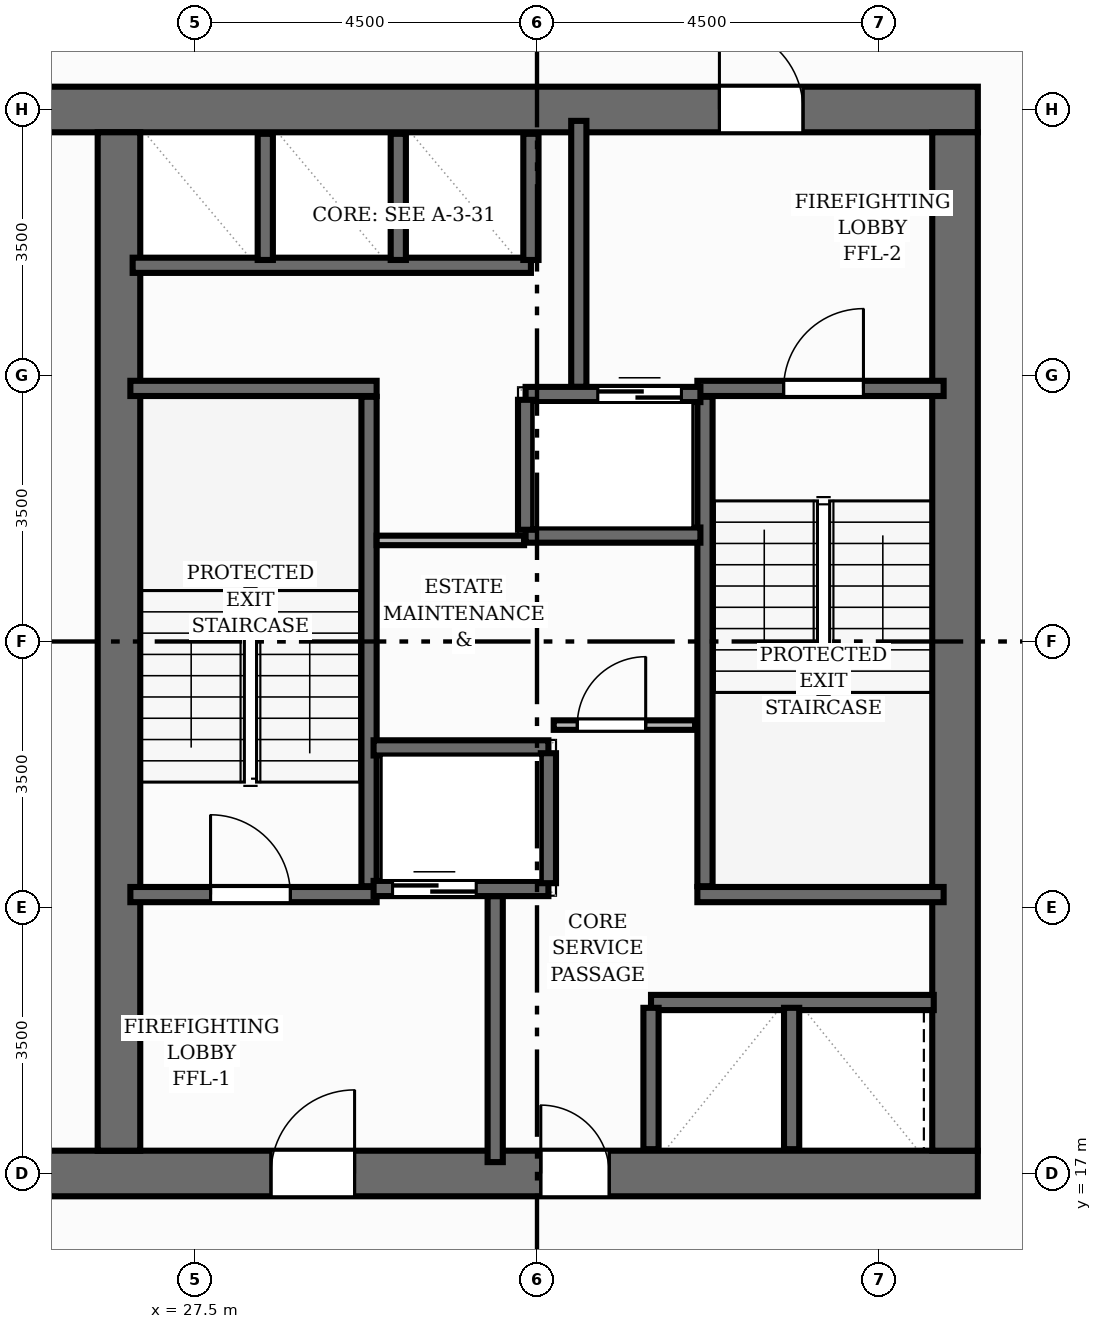
"""IFC4 building model, lengths in metres.
Left out: names, types, materials, properties, quantities, classifications, styles, units other than length and angle.
Written with IfcOpenShell. Run it as: python <this file> out.ifc"""

import sys

from ifc_helpers import new_model, si_unit, direction, frame, frame_2d, origin, place, context, subcontext, project, spatial, rectangle, extrude, element, fill, save


model = new_model("IFC4")
c1 = context("Model", 3, precision=1e-05, world=origin(), true_north=direction((0.0, 1.0)))
c2 = subcontext(c1, "Body", "Model", "MODEL_VIEW")
j1 = project(units=[si_unit("LENGTHUNIT", "METRE"), si_unit("PLANEANGLEUNIT", "RADIAN")], contexts=[c1])
p1 = place(None, origin())
s1 = spatial("IfcSite", under=j1, at=p1, CompositionType="ELEMENT")
p2 = place(p1, origin())
s2 = spatial("IfcBuilding", under=s1, at=p2, CompositionType="ELEMENT")
p3 = place(p2, frame((0.0, 0.0, 126.56)))
s3 = spatial("IfcBuildingStorey", under=s2, at=p3, CompositionType="ELEMENT", Elevation=126.56)
p4 = place(p3, frame((22.7, 17.0, 0.0), z_axis=(0.0, 0.0, 1.0), x_axis=(1.0, 0.0, 0.0)))
e1 = element("IfcWall", 1, at=p4, inside=s3, PredefinedType="SHEAR", context=c2, shape_type="SweptSolid", body=[
    extrude(rectangle(XDim=15.1, YDim=0.6, at=frame_2d((7.55, 0.0))), origin(), (0.0, 0.0, 1.0), 3.2),
])
p5 = place(p4, frame((5.8, 0.0, 0.0)))
e2 = element("IfcOpeningElement", 2, at=p5, cuts=e1, PredefinedType="OPENING", context=c2, shape_type="SweptSolid", body=[
    extrude(rectangle(XDim=1.1, YDim=2.15, at=frame_2d((0.55, 1.075))), frame((0.0, 0.31, 0.0), z_axis=(0.0, -1.0, 0.0), x_axis=(1.0, 0.0, 0.0)), (0.0, 0.0, 1.0), 0.62),
])
p6 = place(p4, frame((9.35, 0.0, 0.0)))
e3 = element("IfcOpeningElement", 3, at=p6, cuts=e1, PredefinedType="OPENING", context=c2, shape_type="SweptSolid", body=[
    extrude(rectangle(XDim=0.9, YDim=2.1, at=frame_2d((0.45, 1.05))), frame((0.0, 0.31, 0.0), z_axis=(0.0, -1.0, 0.0), x_axis=(1.0, 0.0, 0.0)), (0.0, 0.0, 1.0), 0.62),
])
p7 = place(p3, frame((22.7, 31.0, 0.0), z_axis=(0.0, 0.0, 1.0), x_axis=(1.0, 0.0, 0.0)))
e4 = element("IfcWall", 4, at=p7, inside=s3, PredefinedType="SHEAR", context=c2, shape_type="SweptSolid", body=[
    extrude(rectangle(XDim=15.1, YDim=0.6, at=frame_2d((7.55, 0.0))), origin(), (0.0, 0.0, 1.0), 3.2),
])
p8 = place(p7, frame((11.7, 0.0, 0.0)))
e5 = element("IfcOpeningElement", 5, at=p8, cuts=e4, PredefinedType="OPENING", context=c2, shape_type="SweptSolid", body=[
    extrude(rectangle(XDim=1.1, YDim=2.15, at=frame_2d((0.55, 1.075))), frame((0.0, 0.31, 0.0), z_axis=(0.0, -1.0, 0.0), x_axis=(1.0, 0.0, 0.0)), (0.0, 0.0, 1.0), 0.62),
])
p9 = place(p3, frame((37.5, 17.3, 0.0), z_axis=(0.0, 0.0, 1.0), x_axis=(0.0, 1.0, 0.0)))
e6 = element("IfcWall", 6, at=p9, inside=s3, PredefinedType="SHEAR", context=c2, shape_type="SweptSolid", body=[
    extrude(rectangle(XDim=13.4, YDim=0.6, at=frame_2d((6.7, 0.0))), origin(), (0.0, 0.0, 1.0), 3.2),
])
p10 = place(p3, frame((26.5, 17.3, 0.0), z_axis=(0.0, 0.0, 1.0), x_axis=(0.0, 1.0, 0.0)))
e7 = element("IfcWall", 7, at=p10, inside=s3, PredefinedType="SHEAR", context=c2, shape_type="SweptSolid", body=[
    extrude(rectangle(XDim=13.4, YDim=0.56, at=frame_2d((6.7, 0.0))), origin(), (0.0, 0.0, 1.0), 3.2),
])
p11 = place(p3, frame((29.79, 20.78, 0.0), z_axis=(0.0, 0.0, 1.0), x_axis=(0.0, 1.0, 0.0)))
e8 = element("IfcWall", 8, at=p11, inside=s3, PredefinedType="SHEAR", context=c2, shape_type="SweptSolid", body=[
    extrude(rectangle(XDim=6.44, YDim=0.2, at=frame_2d((3.22, 0.0))), origin(), (0.0, 0.0, 1.0), 3.2),
])
p12 = place(p3, frame((26.65, 27.33, 0.0), z_axis=(0.0, 0.0, 1.0), x_axis=(1.0, 0.0, 0.0)))
e9 = element("IfcWall", 9, at=p12, inside=s3, PredefinedType="SHEAR", context=c2, shape_type="SweptSolid", body=[
    extrude(rectangle(XDim=3.24, YDim=0.2, at=frame_2d((1.62, 0.0))), origin(), (0.0, 0.0, 1.0), 3.2),
])
p13 = place(p3, frame((26.65, 20.67, 0.0), z_axis=(0.0, 0.0, 1.0), x_axis=(1.0, 0.0, 0.0)))
e10 = element("IfcWall", 10, at=p13, inside=s3, PredefinedType="SHEAR", context=c2, shape_type="SweptSolid", body=[
    extrude(rectangle(XDim=3.24, YDim=0.2, at=frame_2d((1.62, 0.0))), origin(), (0.0, 0.0, 1.0), 3.2),
])
p14 = place(p13, frame((1.055, 0.0, 0.0)))
e11 = element("IfcOpeningElement", 11, at=p14, cuts=e10, PredefinedType="OPENING", context=c2, shape_type="SweptSolid", body=[
    extrude(rectangle(XDim=1.05, YDim=2.15, at=frame_2d((0.525, 1.075))), frame((0.0, 0.11, 0.0), z_axis=(0.0, -1.0, 0.0), x_axis=(1.0, 0.0, 0.0)), (0.0, 0.0, 1.0), 0.22),
])
p15 = place(p3, frame((34.21, 20.78, 0.0), z_axis=(0.0, 0.0, 1.0), x_axis=(0.0, 1.0, 0.0)))
e12 = element("IfcWall", 12, at=p15, inside=s3, PredefinedType="SHEAR", context=c2, shape_type="SweptSolid", body=[
    extrude(rectangle(XDim=6.44, YDim=0.2, at=frame_2d((3.22, 0.0))), origin(), (0.0, 0.0, 1.0), 3.2),
])
p16 = place(p3, frame((34.11, 20.67, 0.0), z_axis=(0.0, 0.0, 1.0), x_axis=(1.0, 0.0, 0.0)))
e13 = element("IfcWall", 13, at=p16, inside=s3, PredefinedType="SHEAR", context=c2, shape_type="SweptSolid", body=[
    extrude(rectangle(XDim=3.24, YDim=0.2, at=frame_2d((1.62, 0.0))), origin(), (0.0, 0.0, 1.0), 3.2),
])
p17 = place(p3, frame((34.11, 27.33, 0.0), z_axis=(0.0, 0.0, 1.0), x_axis=(1.0, 0.0, 0.0)))
e14 = element("IfcWall", 14, at=p17, inside=s3, PredefinedType="SHEAR", context=c2, shape_type="SweptSolid", body=[
    extrude(rectangle(XDim=3.24, YDim=0.2, at=frame_2d((1.62, 0.0))), origin(), (0.0, 0.0, 1.0), 3.2),
])
p18 = place(p17, frame((1.135, 0.0, 0.0)))
e15 = element("IfcOpeningElement", 15, at=p18, cuts=e14, PredefinedType="OPENING", context=c2, shape_type="SweptSolid", body=[
    extrude(rectangle(XDim=1.05, YDim=2.15, at=frame_2d((0.525, 1.075))), frame((0.0, 0.11, 0.0), z_axis=(0.0, -1.0, 0.0), x_axis=(1.0, 0.0, 0.0)), (0.0, 0.0, 1.0), 0.22),
])
for number, where, z_axis, x_axis in (
    (16, (31.45, 17.15, 0.0), (0.0, 0.0, 1.0), (0.0, 1.0, 0.0)),
    (17, (32.55, 27.35, 0.0), (0.0, 0.0, 1.0), (0.0, 1.0, 0.0)),
):
    element("IfcWall", number, at=place(p3, frame(where, z_axis=z_axis, x_axis=x_axis)), inside=s3, PredefinedType="SHEAR", context=c2, shape_type="SweptSolid", body=[
        extrude(rectangle(XDim=3.5, YDim=0.2, at=frame_2d((1.75, 0.0))), origin(), (0.0, 0.0, 1.0), 3.2),
    ])
p19 = place(p3, frame((29.85, 20.75, 0.0), z_axis=(0.0, 0.0, 1.0), x_axis=(1.0, 0.0, 0.0)))
e18 = element("IfcWall", 18, at=p19, inside=s3, PredefinedType="SHEAR", context=c2, shape_type="SweptSolid", body=[
    extrude(rectangle(XDim=2.3, YDim=0.2, at=frame_2d((1.15, 0.0))), origin(), (0.0, 0.0, 1.0), 3.2),
])
p20 = place(p19, frame((0.25, 0.0, 0.0)))
e19 = element("IfcOpeningElement", 19, at=p20, cuts=e18, PredefinedType="OPENING", context=c2, shape_type="SweptSolid", body=[
    extrude(rectangle(XDim=1.1, YDim=2.15, at=frame_2d((0.55, 1.075))), frame((0.0, 0.11, 0.0), z_axis=(0.0, -1.0, 0.0), x_axis=(1.0, 0.0, 0.0)), (0.0, 0.0, 1.0), 0.22),
])
p21 = place(p3, frame((29.85, 22.6, 0.0), z_axis=(0.0, 0.0, 1.0), x_axis=(1.0, 0.0, 0.0)))
e20 = element("IfcWall", 20, at=p21, inside=s3, PredefinedType="SHEAR", context=c2, shape_type="SweptSolid", body=[
    extrude(rectangle(XDim=2.3, YDim=0.2, at=frame_2d((1.15, 0.0))), origin(), (0.0, 0.0, 1.0), 3.2),
])
p22 = place(p3, frame((32.15, 20.82, 0.0), z_axis=(0.0, 0.0, 1.0), x_axis=(0.0, 1.0, 0.0)))
e21 = element("IfcWall", 21, at=p22, inside=s3, PredefinedType="SHEAR", context=c2, shape_type="SweptSolid", body=[
    extrude(rectangle(XDim=1.71, YDim=0.2, at=frame_2d((0.855, 0.0))), origin(), (0.0, 0.0, 1.0), 3.2),
])
p23 = place(p3, frame((31.85, 27.25, 0.0), z_axis=(0.0, 0.0, 1.0), x_axis=(1.0, 0.0, 0.0)))
e22 = element("IfcWall", 22, at=p23, inside=s3, PredefinedType="SHEAR", context=c2, shape_type="SweptSolid", body=[
    extrude(rectangle(XDim=2.3, YDim=0.2, at=frame_2d((1.15, 0.0))), origin(), (0.0, 0.0, 1.0), 3.2),
])
p24 = place(p23, frame((0.95, 0.0, 0.0)))
e23 = element("IfcOpeningElement", 23, at=p24, cuts=e22, PredefinedType="OPENING", context=c2, shape_type="SweptSolid", body=[
    extrude(rectangle(XDim=1.1, YDim=2.15, at=frame_2d((0.55, 1.075))), frame((0.0, 0.11, 0.0), z_axis=(0.0, -1.0, 0.0), x_axis=(1.0, 0.0, 0.0)), (0.0, 0.0, 1.0), 0.22),
])
p25 = place(p3, frame((31.85, 25.4, 0.0), z_axis=(0.0, 0.0, 1.0), x_axis=(1.0, 0.0, 0.0)))
e24 = element("IfcWall", 24, at=p25, inside=s3, PredefinedType="SHEAR", context=c2, shape_type="SweptSolid", body=[
    extrude(rectangle(XDim=2.3, YDim=0.2, at=frame_2d((1.15, 0.0))), origin(), (0.0, 0.0, 1.0), 3.2),
])
p26 = place(p3, frame((31.85, 25.47, 0.0), z_axis=(0.0, 0.0, 1.0), x_axis=(0.0, 1.0, 0.0)))
e25 = element("IfcWall", 25, at=p26, inside=s3, PredefinedType="SHEAR", context=c2, shape_type="SweptSolid", body=[
    extrude(rectangle(XDim=1.71, YDim=0.2, at=frame_2d((0.855, 0.0))), origin(), (0.0, 0.0, 1.0), 3.2),
])
p27 = place(p3, frame((26.68, 28.95, 0.0), z_axis=(0.0, 0.0, 1.0), x_axis=(1.0, 0.0, 0.0)))
e26 = element("IfcWall", 26, at=p27, inside=s3, PredefinedType="SHEAR", context=c2, shape_type="SweptSolid", body=[
    extrude(rectangle(XDim=5.24, YDim=0.2, at=frame_2d((2.62, 0.0))), origin(), (0.0, 0.0, 1.0), 3.2),
])
for number, where, z_axis, x_axis in (
    (27, (31.92, 29.02, 0.0), (0.0, 0.0, 1.0), (0.0, 1.0, 0.0)),
    (28, (28.425, 29.02, 0.0), (0.0, 0.0, 1.0), (0.0, 1.0, 0.0)),
    (29, (30.175, 29.02, 0.0), (0.0, 0.0, 1.0), (0.0, 1.0, 0.0)),
):
    element("IfcWall", number, at=place(p3, frame(where, z_axis=z_axis, x_axis=x_axis)), inside=s3, PredefinedType="SHEAR", context=c2, shape_type="SweptSolid", body=[
        extrude(rectangle(XDim=1.66, YDim=0.2, at=frame_2d((0.83, 0.0))), origin(), (0.0, 0.0, 1.0), 3.2),
    ])
p28 = place(p3, frame((33.5, 19.25, 0.0), z_axis=(0.0, 0.0, 1.0), x_axis=(1.0, 0.0, 0.0)))
e30 = element("IfcWall", 30, at=p28, inside=s3, PredefinedType="SHEAR", context=c2, shape_type="SweptSolid", body=[
    extrude(rectangle(XDim=3.72, YDim=0.2, at=frame_2d((1.86, 0.0))), origin(), (0.0, 0.0, 1.0), 3.2),
])
for number, where, z_axis, x_axis in (
    (31, (33.5, 17.32, 0.0), (0.0, 0.0, 1.0), (0.0, 1.0, 0.0)),
    (32, (35.35, 17.32, 0.0), (0.0, 0.0, 1.0), (0.0, 1.0, 0.0)),
):
    element("IfcWall", number, at=place(p3, frame(where, z_axis=z_axis, x_axis=x_axis)), inside=s3, PredefinedType="SHEAR", context=c2, shape_type="SweptSolid", body=[
        extrude(rectangle(XDim=1.86, YDim=0.2, at=frame_2d((0.93, 0.0))), origin(), (0.0, 0.0, 1.0), 3.2),
    ])
p29 = place(p3, frame((32.22, 22.9, 0.0), z_axis=(0.0, 0.0, 1.0), x_axis=(1.0, 0.0, 0.0)))
e33 = element("IfcWall", 33, at=p29, inside=s3, PredefinedType="PARTITIONING", context=c2, shape_type="SweptSolid", body=[
    extrude(rectangle(XDim=1.86, YDim=0.125, at=frame_2d((0.93, 0.0))), origin(), (0.0, 0.0, 1.0), 2.955),
])
p30 = place(p29, frame((0.31, 0.0, 0.0)))
e34 = element("IfcOpeningElement", 34, at=p30, cuts=e33, PredefinedType="OPENING", context=c2, shape_type="SweptSolid", body=[
    extrude(rectangle(XDim=0.9, YDim=2.1, at=frame_2d((0.45, 1.05))), frame((0.0, 0.073, 0.0), z_axis=(0.0, -1.0, 0.0), x_axis=(1.0, 0.0, 0.0)), (0.0, 0.0, 1.0), 0.145),
])
p31 = place(p3, frame((29.89, 25.33, 0.0), z_axis=(0.0, 0.0, 1.0), x_axis=(1.0, 0.0, 0.0)))
e35 = element("IfcWall", 35, at=p31, inside=s3, PredefinedType="PARTITIONING", context=c2, shape_type="SweptSolid", body=[
    extrude(rectangle(XDim=1.94, YDim=0.125, at=frame_2d((0.97, 0.0))), origin(), (0.0, 0.0, 1.0), 2.955),
])
p32 = place(p14, origin())
e36 = element("IfcDoor", 36, at=p32, inside=s3, OperationType="SINGLE_SWING_LEFT", PredefinedType="DOOR", context=c2, shape_type="SweptSolid", body=[
    extrude(rectangle(XDim=1.05, YDim=2.15, at=frame_2d((0.525, 1.075))), frame((0.0, 0.025, 0.0), z_axis=(0.0, -1.0, 0.0), x_axis=(1.0, 0.0, 0.0)), (0.0, 0.0, 1.0), 0.05),
])
fill(e11, e36)
p33 = place(p18, origin())
e37 = element("IfcDoor", 37, at=p33, inside=s3, OperationType="SINGLE_SWING_RIGHT", PredefinedType="DOOR", context=c2, shape_type="SweptSolid", body=[
    extrude(rectangle(XDim=1.05, YDim=2.15, at=frame_2d((0.525, 1.075))), frame((0.0, 0.025, 0.0), z_axis=(0.0, -1.0, 0.0), x_axis=(1.0, 0.0, 0.0)), (0.0, 0.0, 1.0), 0.05),
])
fill(e15, e37)
p34 = place(p5, origin())
e38 = element("IfcDoor", 38, at=p34, inside=s3, OperationType="SINGLE_SWING_RIGHT", PredefinedType="DOOR", context=c2, shape_type="SweptSolid", body=[
    extrude(rectangle(XDim=1.1, YDim=2.15, at=frame_2d((0.55, 1.075))), frame((0.0, 0.025, 0.0), z_axis=(0.0, -1.0, 0.0), x_axis=(1.0, 0.0, 0.0)), (0.0, 0.0, 1.0), 0.05),
])
fill(e2, e38)
p35 = place(p8, origin())
e39 = element("IfcDoor", 39, at=p35, inside=s3, OperationType="SINGLE_SWING_LEFT", PredefinedType="DOOR", context=c2, shape_type="SweptSolid", body=[
    extrude(rectangle(XDim=1.1, YDim=2.15, at=frame_2d((0.55, 1.075))), frame((0.0, 0.025, 0.0), z_axis=(0.0, -1.0, 0.0), x_axis=(1.0, 0.0, 0.0)), (0.0, 0.0, 1.0), 0.05),
])
fill(e5, e39)
p36 = place(p20, origin())
e40 = element("IfcDoor", 40, at=p36, inside=s3, OperationType="DOUBLE_DOOR_SLIDING", PredefinedType="DOOR", context=c2, shape_type="SweptSolid", body=[
    extrude(rectangle(XDim=1.1, YDim=2.15, at=frame_2d((0.55, 1.075))), frame((0.0, 0.025, 0.0), z_axis=(0.0, -1.0, 0.0), x_axis=(1.0, 0.0, 0.0)), (0.0, 0.0, 1.0), 0.05),
])
fill(e19, e40)
p37 = place(p24, origin())
e41 = element("IfcDoor", 41, at=p37, inside=s3, OperationType="DOUBLE_DOOR_SLIDING", PredefinedType="DOOR", context=c2, shape_type="SweptSolid", body=[
    extrude(rectangle(XDim=1.1, YDim=2.15, at=frame_2d((0.55, 1.075))), frame((0.0, 0.025, 0.0), z_axis=(0.0, -1.0, 0.0), x_axis=(1.0, 0.0, 0.0)), (0.0, 0.0, 1.0), 0.05),
])
fill(e23, e41)
p38 = place(p6, origin())
e42 = element("IfcDoor", 42, at=p38, inside=s3, OperationType="SINGLE_SWING_LEFT", PredefinedType="DOOR", context=c2, shape_type="SweptSolid", body=[
    extrude(rectangle(XDim=0.9, YDim=2.1, at=frame_2d((0.45, 1.05))), frame((0.0, 0.025, 0.0), z_axis=(0.0, -1.0, 0.0), x_axis=(1.0, 0.0, 0.0)), (0.0, 0.0, 1.0), 0.05),
])
fill(e3, e42)
p39 = place(p30, origin())
e43 = element("IfcDoor", 43, at=p39, inside=s3, OperationType="SINGLE_SWING_RIGHT", PredefinedType="DOOR", context=c2, shape_type="SweptSolid", body=[
    extrude(rectangle(XDim=0.9, YDim=2.1, at=frame_2d((0.45, 1.05))), frame((0.0, 0.025, 0.0), z_axis=(0.0, -1.0, 0.0), x_axis=(1.0, 0.0, 0.0)), (0.0, 0.0, 1.0), 0.05),
])
fill(e34, e43)
save(model, sys.argv[1])
